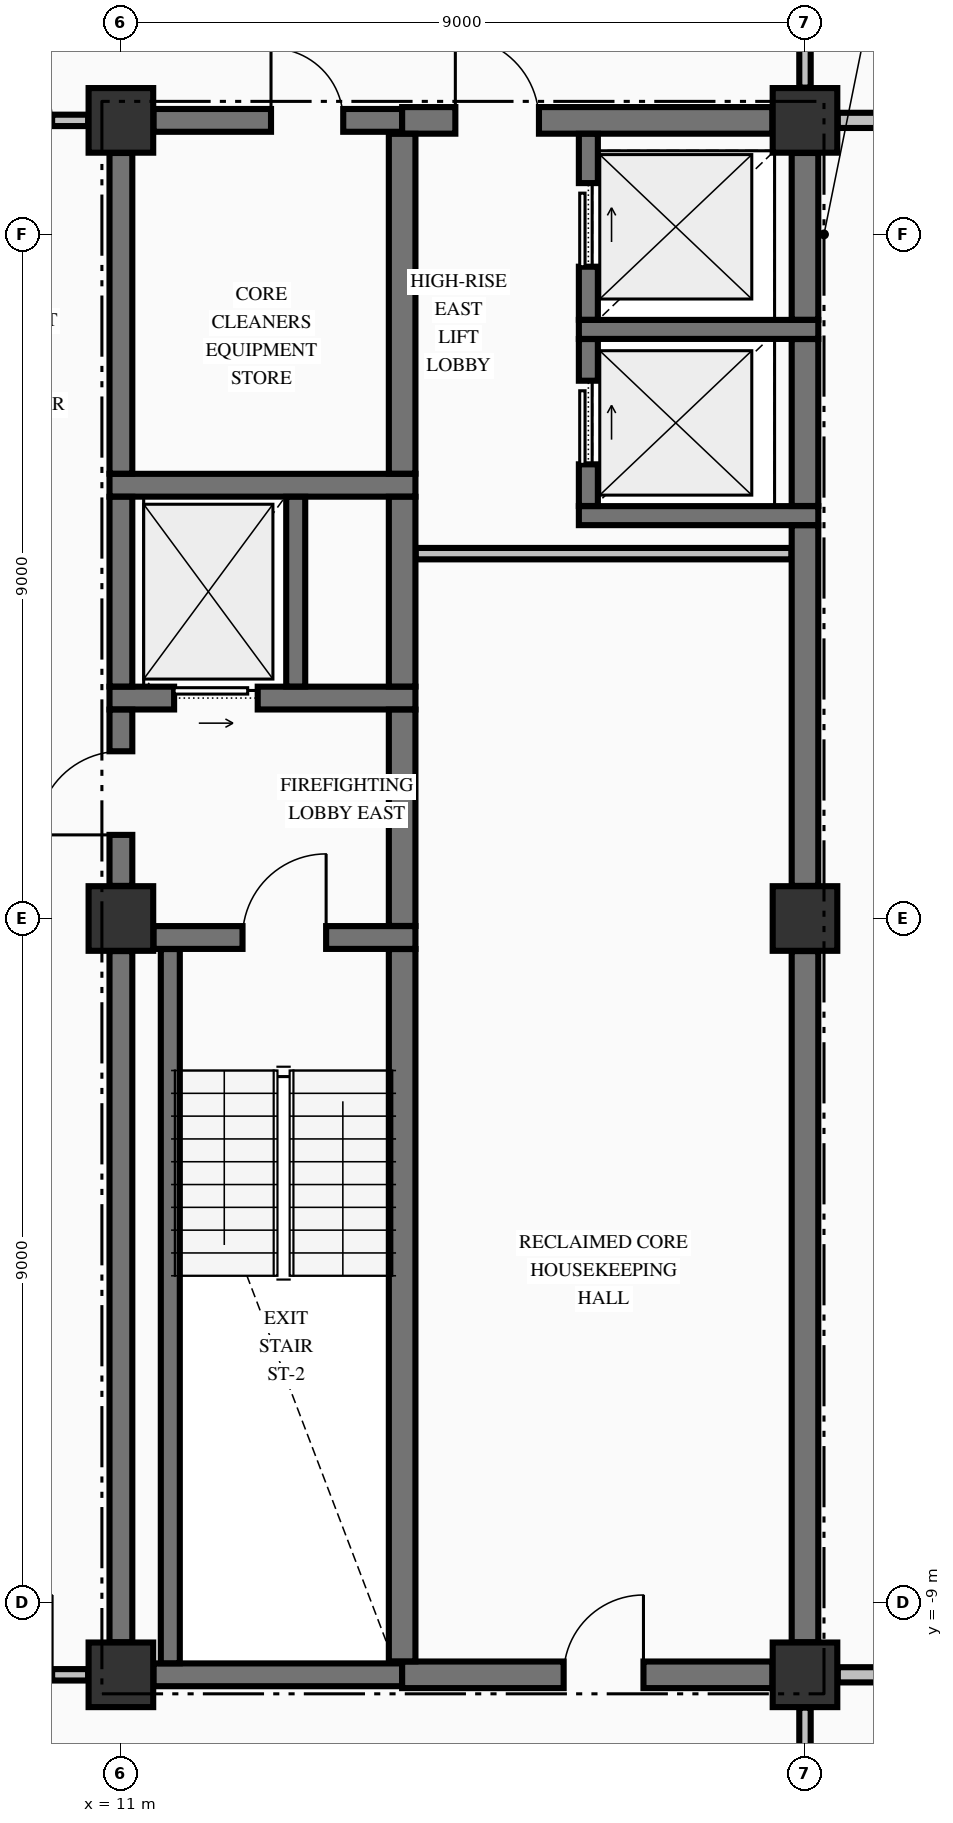
"""IFC4 building model, lengths in metres.
Left out: names, types, materials, properties, quantities, classifications, styles, units other than length and angle.
Written with IfcOpenShell. Run it as: python <this file> out.ifc"""

import sys

from ifc_helpers import new_model, si_unit, direction, frame, frame_2d, origin, origin_2d, place, context, subcontext, project, spatial, rectangle, extrude, element, fill, save


model = new_model("IFC4")
c1 = context("Model", 3, precision=1e-05, world=origin(), true_north=direction((0.0, 1.0)))
c2 = subcontext(c1, "Body", "Model", "MODEL_VIEW")
j1 = project(units=[si_unit("LENGTHUNIT", "METRE"), si_unit("PLANEANGLEUNIT", "RADIAN")], contexts=[c1])
p1 = place(None, origin())
s1 = spatial("IfcSite", under=j1, at=p1, CompositionType="ELEMENT")
p2 = place(p1, origin())
s2 = spatial("IfcBuilding", under=s1, at=p2, CompositionType="ELEMENT")
p3 = place(p2, frame((0.0, 0.0, 179.66)))
s3 = spatial("IfcBuildingStorey", under=s2, at=p3, CompositionType="ELEMENT", Elevation=179.66)
for number, where, z_axis, x_axis in (
    (1, (11.0, -9.95, -0.25), (0.0, 0.0, 1.0), (1.0, 0.0, 0.0)),
    (2, (11.0, 0.0, -0.25), (0.0, 0.0, 1.0), (1.0, 0.0, 0.0)),
    (3, (11.0, 10.5, -0.25), (0.0, 0.0, 1.0), (1.0, 0.0, 0.0)),
    (4, (20.0, -9.95, -0.25), (0.0, 0.0, 1.0), (1.0, 0.0, 0.0)),
    (5, (20.0, 10.5, -0.25), (0.0, 0.0, 1.0), (1.0, 0.0, 0.0)),
    (6, (20.0, 0.0, -0.25), (0.0, 0.0, 1.0), (1.0, 0.0, 0.0)),
):
    element("IfcColumn", number, at=place(p3, frame(where, z_axis=z_axis, x_axis=x_axis)), inside=s3, PredefinedType="COLUMN", context=c2, shape_type="SweptSolid", body=[
        extrude(rectangle(XDim=0.85, YDim=0.85, at=origin_2d()), origin(), (0.0, 0.0, 1.0), 3.4),
    ])
p4 = place(p3, frame((11.429, -9.95, 0.0), z_axis=(0.0, 0.0, 1.0), x_axis=(1.0, 0.0, 0.0)))
e7 = element("IfcWall", 7, at=p4, inside=s3, PredefinedType="SHEAR", context=c2, shape_type="SweptSolid", body=[
    extrude(rectangle(XDim=3.271, YDim=0.3, at=frame_2d((1.635, 0.0))), origin(), (0.0, 0.0, 1.0), 3.15),
])
p5 = place(p3, frame((14.7, -9.95, 0.0), z_axis=(0.0, 0.0, 1.0), x_axis=(1.0, 0.0, 0.0)))
e8 = element("IfcWall", 8, at=p5, inside=s3, PredefinedType="SHEAR", context=c2, shape_type="SweptSolid", body=[
    extrude(rectangle(XDim=4.871, YDim=0.35, at=frame_2d((2.436, 0.0))), origin(), (0.0, 0.0, 1.0), 3.15),
])
p6 = place(p5, frame((2.125, 0.0, 0.0)))
e9 = element("IfcOpeningElement", 9, at=p6, cuts=e8, PredefinedType="OPENING", context=c2, shape_type="SweptSolid", body=[
    extrude(rectangle(XDim=1.05, YDim=2.15, at=frame_2d((0.525, 1.075))), frame((0.0, 0.185, 0.0), z_axis=(0.0, -1.0, 0.0), x_axis=(1.0, 0.0, 0.0)), (0.0, 0.0, 1.0), 0.37),
])
p7 = place(p3, frame((11.429, -0.25, 0.0), z_axis=(0.0, 0.0, 1.0), x_axis=(1.0, 0.0, 0.0)))
e10 = element("IfcWall", 10, at=p7, inside=s3, PredefinedType="SHEAR", context=c2, shape_type="SweptSolid", body=[
    extrude(rectangle(XDim=3.446, YDim=0.3, at=frame_2d((1.723, 0.0))), origin(), (0.0, 0.0, 1.0), 3.15),
])
p8 = place(p7, frame((1.171, 0.0, 0.0)))
e11 = element("IfcOpeningElement", 11, at=p8, cuts=e10, PredefinedType="OPENING", context=c2, shape_type="SweptSolid", body=[
    extrude(rectangle(XDim=1.1, YDim=2.15, at=frame_2d((0.55, 1.075))), frame((0.0, 0.16, 0.0), z_axis=(0.0, -1.0, 0.0), x_axis=(1.0, 0.0, 0.0)), (0.0, 0.0, 1.0), 0.32),
])
p9 = place(p3, frame((10.85, 2.9, 0.0), z_axis=(0.0, 0.0, 1.0), x_axis=(1.0, 0.0, 0.0)))
e12 = element("IfcWall", 12, at=p9, inside=s3, PredefinedType="SHEAR", context=c2, shape_type="SweptSolid", body=[
    extrude(rectangle(XDim=4.025, YDim=0.3, at=frame_2d((2.012, 0.0))), origin(), (0.0, 0.0, 1.0), 3.15),
])
p10 = place(p9, frame((0.85, 0.0, 0.0)))
e13 = element("IfcOpeningElement", 13, at=p10, cuts=e12, PredefinedType="OPENING", context=c2, shape_type="SweptSolid", body=[
    extrude(rectangle(XDim=1.1, YDim=2.2, at=frame_2d((0.55, 1.1))), frame((0.0, 0.16, 0.0), z_axis=(0.0, -1.0, 0.0), x_axis=(1.0, 0.0, 0.0)), (0.0, 0.0, 1.0), 0.32),
])
p11 = place(p3, frame((17.025, 5.3, 0.0), z_axis=(0.0, 0.0, 1.0), x_axis=(1.0, 0.0, 0.0)))
e14 = element("IfcWall", 14, at=p11, inside=s3, PredefinedType="SOLIDWALL", context=c2, shape_type="SweptSolid", body=[
    extrude(rectangle(XDim=3.15, YDim=0.25, at=frame_2d((1.575, 0.0))), origin(), (0.0, 0.0, 1.0), 3.15),
])
p12 = place(p3, frame((10.85, 5.7, 0.0), z_axis=(0.0, 0.0, 1.0), x_axis=(1.0, 0.0, 0.0)))
e15 = element("IfcWall", 15, at=p12, inside=s3, PredefinedType="SHEAR", context=c2, shape_type="SweptSolid", body=[
    extrude(rectangle(XDim=4.025, YDim=0.3, at=frame_2d((2.012, 0.0))), origin(), (0.0, 0.0, 1.0), 3.15),
])
p13 = place(p3, frame((17.025, 7.75, 0.0), z_axis=(0.0, 0.0, 1.0), x_axis=(1.0, 0.0, 0.0)))
e16 = element("IfcWall", 16, at=p13, inside=s3, PredefinedType="SOLIDWALL", context=c2, shape_type="SweptSolid", body=[
    extrude(rectangle(XDim=3.15, YDim=0.25, at=frame_2d((1.575, 0.0))), origin(), (0.0, 0.0, 1.0), 3.15),
])
p14 = place(p3, frame((11.429, 10.5, 0.0), z_axis=(0.0, 0.0, 1.0), x_axis=(1.0, 0.0, 0.0)))
e17 = element("IfcWall", 17, at=p14, inside=s3, PredefinedType="SHEAR", context=c2, shape_type="SweptSolid", body=[
    extrude(rectangle(XDim=3.271, YDim=0.3, at=frame_2d((1.635, 0.0))), origin(), (0.0, 0.0, 1.0), 3.15),
])
p15 = place(p14, frame((1.546, 0.0, 0.0)))
e18 = element("IfcOpeningElement", 18, at=p15, cuts=e17, PredefinedType="OPENING", context=c2, shape_type="SweptSolid", body=[
    extrude(rectangle(XDim=0.95, YDim=2.15, at=frame_2d((0.475, 1.075))), frame((0.0, 0.16, 0.0), z_axis=(0.0, -1.0, 0.0), x_axis=(1.0, 0.0, 0.0)), (0.0, 0.0, 1.0), 0.32),
])
p16 = place(p3, frame((14.7, 10.5, 0.0), z_axis=(0.0, 0.0, 1.0), x_axis=(1.0, 0.0, 0.0)))
e19 = element("IfcWall", 19, at=p16, inside=s3, PredefinedType="SHEAR", context=c2, shape_type="SweptSolid", body=[
    extrude(rectangle(XDim=4.871, YDim=0.35, at=frame_2d((2.436, 0.0))), origin(), (0.0, 0.0, 1.0), 3.15),
])
p17 = place(p16, frame((0.7, 0.0, 0.0)))
e20 = element("IfcOpeningElement", 20, at=p17, cuts=e19, PredefinedType="OPENING", context=c2, shape_type="SweptSolid", body=[
    extrude(rectangle(XDim=1.1, YDim=2.15, at=frame_2d((0.55, 1.075))), frame((0.0, 0.185, 0.0), z_axis=(0.0, -1.0, 0.0), x_axis=(1.0, 0.0, 0.0)), (0.0, 0.0, 1.0), 0.37),
])
p18 = place(p3, frame((-10.569, -9.95, 0.0), z_axis=(0.0, 0.0, 1.0), x_axis=(1.0, 0.0, 0.0)))
e21 = element("IfcWall", 21, at=p18, inside=s3, PredefinedType="PARTITIONING", context=c2, shape_type="SweptSolid", body=[
    extrude(rectangle(XDim=21.138, YDim=0.15, at=frame_2d((10.569, 0.0))), origin(), (0.0, 0.0, 1.0), 3.15),
])
p19 = place(p18, frame((0.474, 0.0, 0.0)))
e22 = element("IfcOpeningElement", 22, at=p19, cuts=e21, PredefinedType="OPENING", context=c2, shape_type="SweptSolid", body=[
    extrude(rectangle(XDim=1.05, YDim=2.15, at=frame_2d((0.525, 1.075))), frame((0.0, 0.085, 0.0), z_axis=(0.0, -1.0, 0.0), x_axis=(1.0, 0.0, 0.0)), (0.0, 0.0, 1.0), 0.17),
])
p20 = place(p18, frame((19.614, 0.0, 0.0)))
e23 = element("IfcOpeningElement", 23, at=p20, cuts=e21, PredefinedType="OPENING", context=c2, shape_type="SweptSolid", body=[
    extrude(rectangle(XDim=1.05, YDim=2.15, at=frame_2d((0.525, 1.075))), frame((0.0, 0.085, 0.0), z_axis=(0.0, -1.0, 0.0), x_axis=(1.0, 0.0, 0.0)), (0.0, 0.0, 1.0), 0.17),
])
p21 = place(p18, frame((11.774, 0.0, 0.0)))
e24 = element("IfcOpeningElement", 24, at=p21, cuts=e21, PredefinedType="OPENING", context=c2, shape_type="SweptSolid", body=[
    extrude(rectangle(XDim=0.95, YDim=2.15, at=frame_2d((0.475, 1.075))), frame((0.0, 0.085, 0.0), z_axis=(0.0, -1.0, 0.0), x_axis=(1.0, 0.0, 0.0)), (0.0, 0.0, 1.0), 0.17),
])
p22 = place(p3, frame((20.431, -9.95, 0.0), z_axis=(0.0, 0.0, 1.0), x_axis=(1.0, 0.0, 0.0)))
e25 = element("IfcWall", 25, at=p22, inside=s3, PredefinedType="PARTITIONING", context=c2, shape_type="SweptSolid", body=[
    extrude(rectangle(XDim=6.404, YDim=0.2, at=frame_2d((3.202, 0.0))), origin(), (0.0, 0.0, 1.0), 3.15),
])
p23 = place(p3, frame((14.878, 4.8, 0.0), z_axis=(0.0, 0.0, 1.0), x_axis=(1.0, 0.0, 0.0)))
e26 = element("IfcWall", 26, at=p23, inside=s3, PredefinedType="PARTITIONING", context=c2, shape_type="SweptSolid", body=[
    extrude(rectangle(XDim=4.944, YDim=0.15, at=frame_2d((2.472, 0.0))), origin(), (0.0, 0.0, 1.0), 3.15),
])
p24 = place(p3, frame((-10.569, 10.5, 0.0), z_axis=(0.0, 0.0, 1.0), x_axis=(1.0, 0.0, 0.0)))
e27 = element("IfcWall", 27, at=p24, inside=s3, PredefinedType="PARTITIONING", context=c2, shape_type="SweptSolid", body=[
    extrude(rectangle(XDim=21.138, YDim=0.15, at=frame_2d((10.569, 0.0))), origin(), (0.0, 0.0, 1.0), 3.15),
])
p25 = place(p24, frame((0.474, 0.0, 0.0)))
e28 = element("IfcOpeningElement", 28, at=p25, cuts=e27, PredefinedType="OPENING", context=c2, shape_type="SweptSolid", body=[
    extrude(rectangle(XDim=1.05, YDim=2.15, at=frame_2d((0.525, 1.075))), frame((0.0, 0.085, 0.0), z_axis=(0.0, -1.0, 0.0), x_axis=(1.0, 0.0, 0.0)), (0.0, 0.0, 1.0), 0.17),
])
p26 = place(p24, frame((19.614, 0.0, 0.0)))
e29 = element("IfcOpeningElement", 29, at=p26, cuts=e27, PredefinedType="OPENING", context=c2, shape_type="SweptSolid", body=[
    extrude(rectangle(XDim=1.05, YDim=2.15, at=frame_2d((0.525, 1.075))), frame((0.0, 0.085, 0.0), z_axis=(0.0, -1.0, 0.0), x_axis=(1.0, 0.0, 0.0)), (0.0, 0.0, 1.0), 0.17),
])
p27 = place(p3, frame((20.431, 10.5, 0.0), z_axis=(0.0, 0.0, 1.0), x_axis=(1.0, 0.0, 0.0)))
e30 = element("IfcWall", 30, at=p27, inside=s3, PredefinedType="PARTITIONING", context=c2, shape_type="SweptSolid", body=[
    extrude(rectangle(XDim=6.404, YDim=0.2, at=frame_2d((3.202, 0.0))), origin(), (0.0, 0.0, 1.0), 3.15),
])
p28 = place(p27, frame((2.594, 0.0, 0.0)))
e31 = element("IfcOpeningElement", 31, at=p28, cuts=e30, PredefinedType="OPENING", context=c2, shape_type="SweptSolid", body=[
    extrude(rectangle(XDim=0.95, YDim=2.15, at=frame_2d((0.475, 1.075))), frame((0.0, 0.11, 0.0), z_axis=(0.0, -1.0, 0.0), x_axis=(1.0, 0.0, 0.0)), (0.0, 0.0, 1.0), 0.22),
])
p29 = place(p3, frame((11.0, -9.521, 0.0), z_axis=(0.0, 0.0, 1.0), x_axis=(0.0, 1.0, 0.0)))
e32 = element("IfcWall", 32, at=p29, inside=s3, PredefinedType="SHEAR", context=c2, shape_type="SweptSolid", body=[
    extrude(rectangle(XDim=9.092, YDim=0.3, at=frame_2d((4.546, 0.0))), origin(), (0.0, 0.0, 1.0), 3.15),
])
p30 = place(p3, frame((11.0, 0.429, 0.0), z_axis=(0.0, 0.0, 1.0), x_axis=(0.0, 1.0, 0.0)))
e33 = element("IfcWall", 33, at=p30, inside=s3, PredefinedType="SHEAR", context=c2, shape_type="SweptSolid", body=[
    extrude(rectangle(XDim=2.319, YDim=0.3, at=frame_2d((1.16, 0.0))), origin(), (0.0, 0.0, 1.0), 3.15),
])
p31 = place(p30, frame((0.671, 0.0, 0.0)))
e34 = element("IfcOpeningElement", 34, at=p31, cuts=e33, PredefinedType="OPENING", context=c2, shape_type="SweptSolid", body=[
    extrude(rectangle(XDim=1.1, YDim=2.15, at=frame_2d((0.55, 1.075))), frame((0.0, 0.16, 0.0), z_axis=(0.0, -1.0, 0.0), x_axis=(1.0, 0.0, 0.0)), (0.0, 0.0, 1.0), 0.32),
])
p32 = place(p3, frame((11.0, 3.052, 0.0), z_axis=(0.0, 0.0, 1.0), x_axis=(0.0, 1.0, 0.0)))
e35 = element("IfcWall", 35, at=p32, inside=s3, PredefinedType="SHEAR", context=c2, shape_type="SweptSolid", body=[
    extrude(rectangle(XDim=2.496, YDim=0.3, at=frame_2d((1.248, 0.0))), origin(), (0.0, 0.0, 1.0), 3.15),
])
p33 = place(p3, frame((11.0, 5.852, 0.0), z_axis=(0.0, 0.0, 1.0), x_axis=(0.0, 1.0, 0.0)))
e36 = element("IfcWall", 36, at=p33, inside=s3, PredefinedType="SHEAR", context=c2, shape_type="SweptSolid", body=[
    extrude(rectangle(XDim=4.219, YDim=0.3, at=frame_2d((2.109, 0.0))), origin(), (0.0, 0.0, 1.0), 3.15),
])
p34 = place(p3, frame((11.65, -9.798, 0.0), z_axis=(0.0, 0.0, 1.0), x_axis=(0.0, 1.0, 0.0)))
e37 = element("IfcWall", 37, at=p34, inside=s3, PredefinedType="SOLIDWALL", context=c2, shape_type="SweptSolid", body=[
    extrude(rectangle(XDim=9.396, YDim=0.25, at=frame_2d((4.698, 0.0))), origin(), (0.0, 0.0, 1.0), 3.15),
])
p35 = place(p3, frame((13.3, 3.052, 0.0), z_axis=(0.0, 0.0, 1.0), x_axis=(0.0, 1.0, 0.0)))
e38 = element("IfcWall", 38, at=p35, inside=s3, PredefinedType="SOLIDWALL", context=c2, shape_type="SweptSolid", body=[
    extrude(rectangle(XDim=2.496, YDim=0.25, at=frame_2d((1.248, 0.0))), origin(), (0.0, 0.0, 1.0), 3.15),
])
p36 = place(p3, frame((14.7, -9.773, 0.0), z_axis=(0.0, 0.0, 1.0), x_axis=(0.0, 1.0, 0.0)))
e39 = element("IfcWall", 39, at=p36, inside=s3, PredefinedType="SHEAR", context=c2, shape_type="SweptSolid", body=[
    extrude(rectangle(XDim=9.371, YDim=0.35, at=frame_2d((4.686, 0.0))), origin(), (0.0, 0.0, 1.0), 3.15),
])
p37 = place(p3, frame((14.7, -0.098, 0.0), z_axis=(0.0, 0.0, 1.0), x_axis=(0.0, 1.0, 0.0)))
e40 = element("IfcWall", 40, at=p37, inside=s3, PredefinedType="SHEAR", context=c2, shape_type="SweptSolid", body=[
    extrude(rectangle(XDim=2.846, YDim=0.35, at=frame_2d((1.423, 0.0))), origin(), (0.0, 0.0, 1.0), 3.15),
])
p38 = place(p3, frame((14.7, 3.052, 0.0), z_axis=(0.0, 0.0, 1.0), x_axis=(0.0, 1.0, 0.0)))
e41 = element("IfcWall", 41, at=p38, inside=s3, PredefinedType="SHEAR", context=c2, shape_type="SweptSolid", body=[
    extrude(rectangle(XDim=2.496, YDim=0.35, at=frame_2d((1.248, 0.0))), origin(), (0.0, 0.0, 1.0), 3.15),
])
p39 = place(p3, frame((14.7, 5.852, 0.0), z_axis=(0.0, 0.0, 1.0), x_axis=(0.0, 1.0, 0.0)))
e42 = element("IfcWall", 42, at=p39, inside=s3, PredefinedType="SHEAR", context=c2, shape_type="SweptSolid", body=[
    extrude(rectangle(XDim=4.471, YDim=0.35, at=frame_2d((2.235, 0.0))), origin(), (0.0, 0.0, 1.0), 3.15),
])
p40 = place(p3, frame((17.15, 5.427, 0.0), z_axis=(0.0, 0.0, 1.0), x_axis=(0.0, 1.0, 0.0)))
e43 = element("IfcWall", 43, at=p40, inside=s3, PredefinedType="SOLIDWALL", context=c2, shape_type="SweptSolid", body=[
    extrude(rectangle(XDim=2.196, YDim=0.25, at=frame_2d((1.098, 0.0))), origin(), (0.0, 0.0, 1.0), 3.15),
])
p41 = place(p40, frame((0.548, 0.0, 0.0)))
e44 = element("IfcOpeningElement", 44, at=p41, cuts=e43, PredefinedType="OPENING", context=c2, shape_type="SweptSolid", body=[
    extrude(rectangle(XDim=1.1, YDim=2.2, at=frame_2d((0.55, 1.1))), frame((0.0, 0.135, 0.0), z_axis=(0.0, -1.0, 0.0), x_axis=(1.0, 0.0, 0.0)), (0.0, 0.0, 1.0), 0.27),
])
p42 = place(p3, frame((17.15, 7.877, 0.0), z_axis=(0.0, 0.0, 1.0), x_axis=(0.0, 1.0, 0.0)))
e45 = element("IfcWall", 45, at=p42, inside=s3, PredefinedType="SOLIDWALL", context=c2, shape_type="SweptSolid", body=[
    extrude(rectangle(XDim=2.446, YDim=0.25, at=frame_2d((1.223, 0.0))), origin(), (0.0, 0.0, 1.0), 3.15),
])
p43 = place(p42, frame((0.698, 0.0, 0.0)))
e46 = element("IfcOpeningElement", 46, at=p43, cuts=e45, PredefinedType="OPENING", context=c2, shape_type="SweptSolid", body=[
    extrude(rectangle(XDim=1.1, YDim=2.2, at=frame_2d((0.55, 1.1))), frame((0.0, 0.135, 0.0), z_axis=(0.0, -1.0, 0.0), x_axis=(1.0, 0.0, 0.0)), (0.0, 0.0, 1.0), 0.27),
])
p44 = place(p3, frame((20.0, -9.521, 0.0), z_axis=(0.0, 0.0, 1.0), x_axis=(0.0, 1.0, 0.0)))
e47 = element("IfcWall", 47, at=p44, inside=s3, PredefinedType="SHEAR", context=c2, shape_type="SweptSolid", body=[
    extrude(rectangle(XDim=9.092, YDim=0.35, at=frame_2d((4.546, 0.0))), origin(), (0.0, 0.0, 1.0), 3.15),
])
p45 = place(p3, frame((20.0, 0.429, 0.0), z_axis=(0.0, 0.0, 1.0), x_axis=(0.0, 1.0, 0.0)))
e48 = element("IfcWall", 48, at=p45, inside=s3, PredefinedType="SHEAR", context=c2, shape_type="SweptSolid", body=[
    extrude(rectangle(XDim=4.744, YDim=0.35, at=frame_2d((2.372, 0.0))), origin(), (0.0, 0.0, 1.0), 3.15),
])
p46 = place(p3, frame((20.0, 5.427, 0.0), z_axis=(0.0, 0.0, 1.0), x_axis=(0.0, 1.0, 0.0)))
e49 = element("IfcWall", 49, at=p46, inside=s3, PredefinedType="SHEAR", context=c2, shape_type="SweptSolid", body=[
    extrude(rectangle(XDim=2.196, YDim=0.35, at=frame_2d((1.098, 0.0))), origin(), (0.0, 0.0, 1.0), 3.15),
])
p47 = place(p3, frame((20.0, 7.877, 0.0), z_axis=(0.0, 0.0, 1.0), x_axis=(0.0, 1.0, 0.0)))
e50 = element("IfcWall", 50, at=p47, inside=s3, PredefinedType="SHEAR", context=c2, shape_type="SweptSolid", body=[
    extrude(rectangle(XDim=2.194, YDim=0.35, at=frame_2d((1.097, 0.0))), origin(), (0.0, 0.0, 1.0), 3.15),
])
p48 = place(p3, frame((20.0, -12.097, 0.0), z_axis=(0.0, 0.0, 1.0), x_axis=(0.0, 1.0, 0.0)))
e51 = element("IfcWall", 51, at=p48, inside=s3, PredefinedType="PARTITIONING", context=c2, shape_type="SweptSolid", body=[
    extrude(rectangle(XDim=1.716, YDim=0.15, at=frame_2d((0.858, 0.0))), origin(), (0.0, 0.0, 1.0), 2.342),
])
p49 = place(p3, frame((20.0, 10.931, 0.0), z_axis=(0.0, 0.0, 1.0), x_axis=(0.0, 1.0, 0.0)))
e52 = element("IfcWall", 52, at=p49, inside=s3, PredefinedType="PARTITIONING", context=c2, shape_type="SweptSolid", body=[
    extrude(rectangle(XDim=2.516, YDim=0.15, at=frame_2d((1.258, 0.0))), origin(), (0.0, 0.0, 1.0), 2.342),
])
p50 = place(p49, frame((0.624, 0.0, 0.0)))
e53 = element("IfcOpeningElement", 53, at=p50, cuts=e52, PredefinedType="OPENING", context=c2, shape_type="SweptSolid", body=[
    extrude(rectangle(XDim=0.95, YDim=2.15, at=frame_2d((0.475, 1.075))), frame((0.0, 0.085, 0.0), z_axis=(0.0, -1.0, 0.0), x_axis=(1.0, 0.0, 0.0)), (0.0, 0.0, 1.0), 0.17),
])
p51 = place(p8, origin())
e54 = element("IfcDoor", 54, at=p51, inside=s3, OperationType="SINGLE_SWING_RIGHT", PredefinedType="DOOR", context=c2, shape_type="SweptSolid", body=[
    extrude(rectangle(XDim=1.1, YDim=2.15, at=frame_2d((0.55, 1.075))), frame((0.0, 0.025, 0.0), z_axis=(0.0, -1.0, 0.0), x_axis=(1.0, 0.0, 0.0)), (0.0, 0.0, 1.0), 0.05),
])
fill(e11, e54)
p52 = place(p31, origin())
e55 = element("IfcDoor", 55, at=p52, inside=s3, OperationType="SINGLE_SWING_LEFT", PredefinedType="DOOR", context=c2, shape_type="SweptSolid", body=[
    extrude(rectangle(XDim=1.1, YDim=2.15, at=frame_2d((0.55, 1.075))), frame((0.0, 0.025, 0.0), z_axis=(0.0, -1.0, 0.0), x_axis=(1.0, 0.0, 0.0)), (0.0, 0.0, 1.0), 0.05),
])
fill(e34, e55)
p53 = place(p10, origin())
e56 = element("IfcDoor", 56, at=p53, inside=s3, OperationType="SLIDING_TO_RIGHT", PredefinedType="DOOR", context=c2, shape_type="SweptSolid", body=[
    extrude(rectangle(XDim=1.1, YDim=2.2, at=frame_2d((0.55, 1.1))), frame((0.0, 0.025, 0.0), z_axis=(0.0, -1.0, 0.0), x_axis=(1.0, 0.0, 0.0)), (0.0, 0.0, 1.0), 0.05),
])
fill(e13, e56)
p54 = place(p15, origin())
e57 = element("IfcDoor", 57, at=p54, inside=s3, OperationType="SINGLE_SWING_LEFT", PredefinedType="DOOR", context=c2, shape_type="SweptSolid", body=[
    extrude(rectangle(XDim=0.95, YDim=2.15, at=frame_2d((0.475, 1.075))), frame((0.0, 0.025, 0.0), z_axis=(0.0, -1.0, 0.0), x_axis=(1.0, 0.0, 0.0)), (0.0, 0.0, 1.0), 0.05),
])
fill(e18, e57)
p55 = place(p41, origin())
e58 = element("IfcDoor", 58, at=p55, inside=s3, OperationType="SLIDING_TO_RIGHT", PredefinedType="DOOR", context=c2, shape_type="SweptSolid", body=[
    extrude(rectangle(XDim=1.1, YDim=2.2, at=frame_2d((0.55, 1.1))), frame((0.0, 0.025, 0.0), z_axis=(0.0, -1.0, 0.0), x_axis=(1.0, 0.0, 0.0)), (0.0, 0.0, 1.0), 0.05),
])
fill(e44, e58)
p56 = place(p43, origin())
e59 = element("IfcDoor", 59, at=p56, inside=s3, OperationType="SLIDING_TO_RIGHT", PredefinedType="DOOR", context=c2, shape_type="SweptSolid", body=[
    extrude(rectangle(XDim=1.1, YDim=2.2, at=frame_2d((0.55, 1.1))), frame((0.0, 0.025, 0.0), z_axis=(0.0, -1.0, 0.0), x_axis=(1.0, 0.0, 0.0)), (0.0, 0.0, 1.0), 0.05),
])
fill(e46, e59)
p57 = place(p17, origin())
e60 = element("IfcDoor", 60, at=p57, inside=s3, OperationType="SINGLE_SWING_LEFT", PredefinedType="DOOR", context=c2, shape_type="SweptSolid", body=[
    extrude(rectangle(XDim=1.1, YDim=2.15, at=frame_2d((0.55, 1.075))), frame((0.0, 0.025, 0.0), z_axis=(0.0, -1.0, 0.0), x_axis=(1.0, 0.0, 0.0)), (0.0, 0.0, 1.0), 0.05),
])
fill(e20, e60)
p58 = place(p6, origin())
e61 = element("IfcDoor", 61, at=p58, inside=s3, OperationType="SINGLE_SWING_RIGHT", PredefinedType="DOOR", context=c2, shape_type="SweptSolid", body=[
    extrude(rectangle(XDim=1.05, YDim=2.15, at=frame_2d((0.525, 1.075))), frame((0.0, 0.025, 0.0), z_axis=(0.0, -1.0, 0.0), x_axis=(1.0, 0.0, 0.0)), (0.0, 0.0, 1.0), 0.05),
])
fill(e9, e61)
save(model, sys.argv[1])
